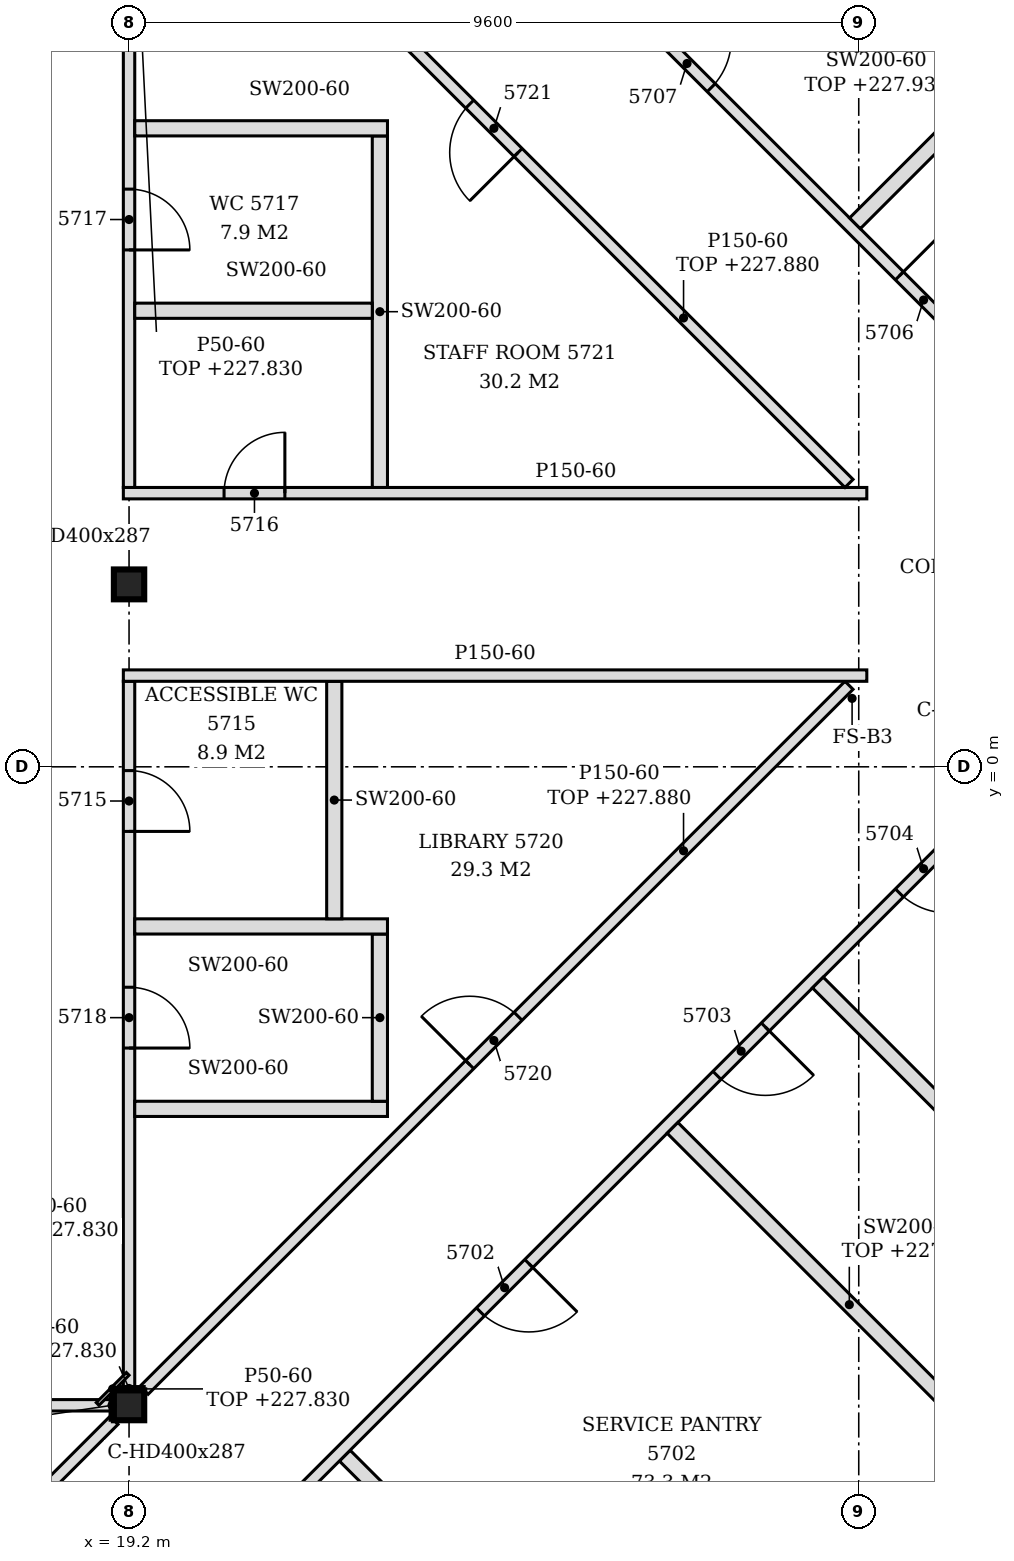
"""IFC4 building model, lengths in metres.
Left out: names, types, materials, properties, quantities, classifications, styles, units other than length and angle.
Written with IfcOpenShell. Run it as: python <this file> out.ifc"""

import sys

from ifc_helpers import new_model, si_unit, direction, frame, frame_2d, origin, origin_2d, place, context, subcontext, project, spatial, polyline, rectangle, i_section, outline, extrude, element, fill, save


model = new_model("IFC4")
c1 = context("Model", 3, precision=1e-05, world=origin(), true_north=direction((0.0, 1.0)))
c2 = subcontext(c1, "Body", "Model", "MODEL_VIEW")
j1 = project(units=[si_unit("LENGTHUNIT", "METRE"), si_unit("PLANEANGLEUNIT", "RADIAN")], contexts=[c1])
p1 = place(None, origin())
s1 = spatial("IfcSite", under=j1, at=p1, CompositionType="ELEMENT")
p2 = place(p1, origin())
s2 = spatial("IfcBuilding", under=s1, at=p2, CompositionType="ELEMENT")
p3 = place(p2, frame((0.0, 0.0, 225.0)))
s3 = spatial("IfcBuildingStorey", under=s2, at=p3, CompositionType="ELEMENT", Elevation=225.0)
for number, where, z_axis, x_axis in (
    (1, (19.2, -8.4, -0.15), (0.0, 0.0, 1.0), (1.0, 0.0, 0.0)),
    (2, (19.2, 2.4, -0.15), (0.0, 0.0, 1.0), (1.0, 0.0, 0.0)),
):
    element("IfcColumn", number, at=place(p3, frame(where, z_axis=z_axis, x_axis=x_axis)), inside=s3, PredefinedType="COLUMN", context=c2, shape_type="SweptSolid", body=[
        extrude(i_section(OverallWidth=0.399, OverallDepth=0.393, WebThickness=0.023, FlangeThickness=0.037, FilletRadius=0.015, at=origin_2d()), origin(), (0.0, 0.0, 1.0), 3.6),
    ])
p4 = place(p3, frame((29.636, -16.66, 0.0), z_axis=(0.0, 0.0, 1.0), x_axis=(-0.707095420673, 0.707118141518, 0.0)))
e3 = element("IfcWall", 3, at=p4, inside=s3, PredefinedType="PARTITIONING", context=c2, shape_type="SweptSolid", body=[
    extrude(rectangle(XDim=10.745, YDim=0.2, at=frame_2d((5.373, 0.0))), origin(), (0.0, 0.0, 1.0), 2.88),
])
p5 = place(p3, frame((16.722, -14.272, 0.0), z_axis=(0.0, 0.0, 1.0), x_axis=(0.707106781187, 0.707106781187, 0.0)))
e4 = element("IfcWall", 4, at=p5, inside=s3, PredefinedType="PARTITIONING", context=c2, shape_type="SweptSolid", body=[
    extrude(rectangle(XDim=20.049, YDim=0.15, at=frame_2d((10.025, 0.0))), origin(), (0.0, 0.0, 1.0), 2.73),
])
p6 = place(p5, frame((4.892, 0.0, 0.0)))
e5 = element("IfcOpeningElement", 5, at=p6, cuts=e4, PredefinedType="OPENING", context=c2, shape_type="SweptSolid", body=[
    extrude(rectangle(XDim=0.9, YDim=2.1, at=frame_2d((0.45, 1.05))), frame((0.0, 0.085, 0.0), z_axis=(0.0, -1.0, 0.0), x_axis=(1.0, 0.0, 0.0)), (0.0, 0.0, 1.0), 0.17),
])
p7 = place(p5, frame((10.042, 0.0, 0.0)))
e6 = element("IfcOpeningElement", 6, at=p7, cuts=e4, PredefinedType="OPENING", context=c2, shape_type="SweptSolid", body=[
    extrude(rectangle(XDim=0.9, YDim=2.1, at=frame_2d((0.45, 1.05))), frame((0.0, 0.085, 0.0), z_axis=(0.0, -1.0, 0.0), x_axis=(1.0, 0.0, 0.0)), (0.0, 0.0, 1.0), 0.17),
])
p8 = place(p5, frame((14.443, 0.0, 0.0)))
e7 = element("IfcOpeningElement", 7, at=p8, cuts=e4, PredefinedType="OPENING", context=c2, shape_type="SweptSolid", body=[
    extrude(rectangle(XDim=0.9, YDim=2.1, at=frame_2d((0.45, 1.05))), frame((0.0, 0.085, 0.0), z_axis=(0.0, -1.0, 0.0), x_axis=(1.0, 0.0, 0.0)), (0.0, 0.0, 1.0), 0.17),
])
p9 = place(p5, frame((17.837, 0.0, 0.0)))
e8 = element("IfcOpeningElement", 8, at=p9, cuts=e4, PredefinedType="OPENING", context=c2, shape_type="SweptSolid", body=[
    extrude(rectangle(XDim=0.9, YDim=2.1, at=frame_2d((0.45, 1.05))), frame((0.0, 0.085, 0.0), z_axis=(0.0, -1.0, 0.0), x_axis=(1.0, 0.0, 0.0)), (0.0, 0.0, 1.0), 0.17),
])
p10 = place(p3, frame((15.728, -11.872, 0.0), z_axis=(0.0, 0.0, 1.0), x_axis=(0.707080416772, 0.707133144618, 0.0)))
e9 = element("IfcWall", 9, at=p10, inside=s3, PredefinedType="PARTITIONING", context=c2, shape_type="SweptSolid", body=[
    extrude(rectangle(XDim=4.63, YDim=0.15, at=frame_2d((2.315, 0.0))), origin(), (0.0, 0.0, 1.0), 3.45),
])
p11 = place(p3, frame((35.86, -10.436, 0.0), z_axis=(0.0, 0.0, 1.0), x_axis=(-0.707106781187, 0.707106781187, 0.0)))
e10 = element("IfcWall", 10, at=p11, inside=s3, PredefinedType="PARTITIONING", context=c2, shape_type="SweptSolid", body=[
    extrude(rectangle(XDim=10.745, YDim=0.2, at=frame_2d((5.373, 0.0))), origin(), (0.0, 0.0, 1.0), 2.88),
])
p12 = place(p3, frame((31.002, -9.402, 0.0), z_axis=(0.0, 0.0, 1.0), x_axis=(-0.707088226093, 0.707125335793, 0.0)))
e11 = element("IfcWall", 11, at=p12, inside=s3, PredefinedType="PARTITIONING", context=c2, shape_type="SweptSolid", body=[
    extrude(rectangle(XDim=6.579, YDim=0.2, at=frame_2d((3.29, 0.0))), origin(), (0.0, 0.0, 1.0), 2.88),
])
p13 = place(p3, frame((7.399, -8.4, 0.0), z_axis=(0.0, 0.0, 1.0), x_axis=(1.0, 0.0, 0.0)))
e12 = element("IfcWall", 12, at=p13, inside=s3, PredefinedType="PARTITIONING", context=c2, shape_type="SweptSolid", body=[
    extrude(rectangle(XDim=11.601, YDim=0.15, at=frame_2d((5.801, 0.0))), origin(), (0.0, 0.0, 1.0), 2.83),
])
p14 = place(p13, frame((5.351, 0.0, 0.0)))
e13 = element("IfcOpeningElement", 13, at=p14, cuts=e12, PredefinedType="OPENING", context=c2, shape_type="SweptSolid", body=[
    extrude(rectangle(XDim=0.9, YDim=2.1, at=frame_2d((0.45, 1.05))), frame((0.0, 0.085, 0.0), z_axis=(0.0, -1.0, 0.0), x_axis=(1.0, 0.0, 0.0)), (0.0, 0.0, 1.0), 0.17),
])
p15 = place(p3, frame((19.2, -8.204, 0.0), z_axis=(0.0, 0.0, 1.0), x_axis=(0.0, 1.0, 0.0)))
e14 = element("IfcWall", 14, at=p15, inside=s3, PredefinedType="PARTITIONING", context=c2, shape_type="SweptSolid", body=[
    extrude(rectangle(XDim=9.329, YDim=0.15, at=frame_2d((4.664, 0.0))), origin(), (0.0, 0.0, 1.0), 2.83),
])
p16 = place(p15, frame((7.354, 0.0, 0.0)))
e15 = element("IfcOpeningElement", 15, at=p16, cuts=e14, PredefinedType="OPENING", context=c2, shape_type="SweptSolid", body=[
    extrude(rectangle(XDim=0.8, YDim=2.1, at=frame_2d((0.4, 1.05))), frame((0.0, 0.085, 0.0), z_axis=(0.0, -1.0, 0.0), x_axis=(1.0, 0.0, 0.0)), (0.0, 0.0, 1.0), 0.17),
])
p17 = place(p15, frame((4.503, 0.0, 0.0)))
e16 = element("IfcOpeningElement", 16, at=p17, cuts=e14, PredefinedType="OPENING", context=c2, shape_type="SweptSolid", body=[
    extrude(rectangle(XDim=0.8, YDim=2.1, at=frame_2d((0.4, 1.05))), frame((0.0, 0.085, 0.0), z_axis=(0.0, -1.0, 0.0), x_axis=(1.0, 0.0, 0.0)), (0.0, 0.0, 1.0), 0.17),
])
p18 = place(p3, frame((19.398, -8.202, 0.0), z_axis=(0.0, 0.0, 1.0), x_axis=(0.707116088468, 0.707097473782, 0.0)))
e17 = element("IfcWall", 17, at=p18, inside=s3, PredefinedType="PARTITIONING", context=c2, shape_type="SweptSolid", body=[
    extrude(rectangle(XDim=13.115, YDim=0.15, at=frame_2d((6.558, 0.0))), origin(), (0.0, 0.0, 1.0), 2.88),
])
p19 = place(p18, frame((6.058, 0.0, 0.0)))
e18 = element("IfcOpeningElement", 18, at=p19, cuts=e17, PredefinedType="OPENING", context=c2, shape_type="SweptSolid", body=[
    extrude(rectangle(XDim=0.9, YDim=2.1, at=frame_2d((0.45, 1.05))), frame((0.0, 0.085, 0.0), z_axis=(0.0, -1.0, 0.0), x_axis=(1.0, 0.0, 0.0)), (0.0, 0.0, 1.0), 0.17),
])
p20 = place(p3, frame((19.275, -4.5, 0.0), z_axis=(0.0, 0.0, 1.0), x_axis=(1.0, 0.0, 0.0)))
e19 = element("IfcWall", 19, at=p20, inside=s3, PredefinedType="PARTITIONING", context=c2, shape_type="SweptSolid", body=[
    extrude(outline(polyline([(0.0, 0.0), (3.325, 0.0), (3.325, 3.45), (0.075, 3.45), (0.073, 2.83), (0.0, 2.83), (0.0, 0.0)])), frame((0.0, 0.1, 0.0), z_axis=(0.0, -1.0, 0.0), x_axis=(1.0, 0.0, 0.0)), (0.0, 0.0, 1.0), 0.2),
])
p21 = place(p3, frame((22.5, -4.4, 0.0), z_axis=(0.0, 0.0, 1.0), x_axis=(0.0, 1.0, 0.0)))
e20 = element("IfcWall", 20, at=p21, inside=s3, PredefinedType="PARTITIONING", context=c2, shape_type="SweptSolid", body=[
    extrude(rectangle(XDim=2.2, YDim=0.2, at=frame_2d((1.1, 0.0))), origin(), (0.0, 0.0, 1.0), 3.45),
])
p22 = place(p3, frame((19.275, -2.1, 0.0), z_axis=(0.0, 0.0, 1.0), x_axis=(1.0, 0.0, 0.0)))
e21 = element("IfcWall", 21, at=p22, inside=s3, PredefinedType="PARTITIONING", context=c2, shape_type="SweptSolid", body=[
    extrude(outline(polyline([(0.0, 0.0), (3.325, 0.0), (3.325, 3.45), (0.075, 3.45), (0.073, 2.83), (0.0, 2.83), (0.0, 0.0)])), frame((0.0, 0.1, 0.0), z_axis=(0.0, -1.0, 0.0), x_axis=(1.0, 0.0, 0.0)), (0.0, 0.0, 1.0), 0.2),
])
p23 = place(p3, frame((21.9, -2.0, 0.0), z_axis=(0.0, 0.0, 1.0), x_axis=(0.0, 1.0, 0.0)))
e22 = element("IfcWall", 22, at=p23, inside=s3, PredefinedType="PARTITIONING", context=c2, shape_type="SweptSolid", body=[
    extrude(outline(polyline([(0.0, 0.0), (3.125, 0.0), (3.125, 3.45), (2.105, 3.45), (2.103, 2.88), (1.895, 2.88), (1.893, 3.45), (0.0, 3.45), (0.0, 0.0)])), frame((0.0, 0.1, 0.0), z_axis=(0.0, -1.0, 0.0), x_axis=(1.0, 0.0, 0.0)), (0.0, 0.0, 1.0), 0.2),
])
p24 = place(p3, frame((19.125, 1.2, 0.0), z_axis=(0.0, 0.0, 1.0), x_axis=(1.0, 0.0, 0.0)))
e23 = element("IfcWall", 23, at=p24, inside=s3, PredefinedType="PARTITIONING", context=c2, shape_type="SweptSolid", body=[
    extrude(outline(polyline([(0.0, 0.0), (9.781, 0.0), (9.781, 3.45), (0.225, 3.45), (0.223, 2.83), (0.0, 2.83), (0.0, 0.0)])), frame((0.0, 0.075, 0.0), z_axis=(0.0, -1.0, 0.0), x_axis=(1.0, 0.0, 0.0)), (0.0, 0.0, 1.0), 0.15),
])
p25 = place(p3, frame((33.341, 2.453, 0.0), z_axis=(0.0, 0.0, 1.0), x_axis=(-0.707098652635, 0.707114909645, 0.0)))
e24 = element("IfcWall", 24, at=p25, inside=s3, PredefinedType="PARTITIONING", context=c2, shape_type="SweptSolid", body=[
    extrude(rectangle(XDim=15.018, YDim=0.15, at=frame_2d((7.509, 0.0))), origin(), (0.0, 0.0, 1.0), 2.88),
])
p26 = place(p25, frame((4.766, 0.0, 0.0)))
e25 = element("IfcOpeningElement", 25, at=p26, cuts=e24, PredefinedType="OPENING", context=c2, shape_type="SweptSolid", body=[
    extrude(rectangle(XDim=0.9, YDim=2.1, at=frame_2d((0.45, 1.05))), frame((0.0, 0.085, 0.0), z_axis=(0.0, -1.0, 0.0), x_axis=(1.0, 0.0, 0.0)), (0.0, 0.0, 1.0), 0.17),
])
p27 = place(p25, frame((9.167, 0.0, 0.0)))
e26 = element("IfcOpeningElement", 26, at=p27, cuts=e24, PredefinedType="OPENING", context=c2, shape_type="SweptSolid", body=[
    extrude(rectangle(XDim=0.9, YDim=2.1, at=frame_2d((0.45, 1.05))), frame((0.0, 0.085, 0.0), z_axis=(0.0, -1.0, 0.0), x_axis=(1.0, 0.0, 0.0)), (0.0, 0.0, 1.0), 0.17),
])
p28 = place(p25, frame((13.482, 0.0, 0.0)))
e27 = element("IfcOpeningElement", 27, at=p28, cuts=e24, PredefinedType="OPENING", context=c2, shape_type="SweptSolid", body=[
    extrude(rectangle(XDim=0.9, YDim=2.1, at=frame_2d((0.45, 1.05))), frame((0.0, 0.085, 0.0), z_axis=(0.0, -1.0, 0.0), x_axis=(1.0, 0.0, 0.0)), (0.0, 0.0, 1.0), 0.17),
])
p29 = place(p3, frame((19.125, 3.6, 0.0), z_axis=(0.0, 0.0, 1.0), x_axis=(1.0, 0.0, 0.0)))
e28 = element("IfcWall", 28, at=p29, inside=s3, PredefinedType="PARTITIONING", context=c2, shape_type="SweptSolid", body=[
    extrude(outline(polyline([(0.0, 0.0), (9.781, 0.0), (9.781, 3.45), (0.225, 3.45), (0.223, 2.83), (0.0, 2.83), (0.0, 0.0)])), frame((0.0, 0.075, 0.0), z_axis=(0.0, -1.0, 0.0), x_axis=(1.0, 0.0, 0.0)), (0.0, 0.0, 1.0), 0.15),
])
p30 = place(p29, frame((1.325, 0.0, 0.0)))
e29 = element("IfcOpeningElement", 29, at=p30, cuts=e28, PredefinedType="OPENING", context=c2, shape_type="SweptSolid", body=[
    extrude(rectangle(XDim=0.8, YDim=2.1, at=frame_2d((0.4, 1.05))), frame((0.0, 0.085, 0.0), z_axis=(0.0, -1.0, 0.0), x_axis=(1.0, 0.0, 0.0)), (0.0, 0.0, 1.0), 0.17),
])
p31 = place(p3, frame((19.2, 3.675, 0.0), z_axis=(0.0, 0.0, 1.0), x_axis=(0.0, 1.0, 0.0)))
e30 = element("IfcWall", 30, at=p31, inside=s3, PredefinedType="PARTITIONING", context=c2, shape_type="SweptSolid", body=[
    extrude(rectangle(XDim=9.328, YDim=0.15, at=frame_2d((4.664, 0.0))), origin(), (0.0, 0.0, 1.0), 2.83),
])
p32 = place(p31, frame((3.125, 0.0, 0.0)))
e31 = element("IfcOpeningElement", 31, at=p32, cuts=e30, PredefinedType="OPENING", context=c2, shape_type="SweptSolid", body=[
    extrude(rectangle(XDim=0.8, YDim=2.1, at=frame_2d((0.4, 1.05))), frame((0.0, 0.085, 0.0), z_axis=(0.0, -1.0, 0.0), x_axis=(1.0, 0.0, 0.0)), (0.0, 0.0, 1.0), 0.17),
])
p33 = place(p3, frame((22.5, 3.675, 0.0), z_axis=(0.0, 0.0, 1.0), x_axis=(0.0, 1.0, 0.0)))
e32 = element("IfcWall", 32, at=p33, inside=s3, PredefinedType="PARTITIONING", context=c2, shape_type="SweptSolid", body=[
    extrude(outline(polyline([(0.0, 0.0), (4.625, 0.0), (4.625, 3.45), (1.23, 3.45), (1.228, 2.88), (1.02, 2.88), (1.018, 3.45), (0.0, 3.45), (0.0, 0.0)])), frame((0.0, 0.1, 0.0), z_axis=(0.0, -1.0, 0.0), x_axis=(1.0, 0.0, 0.0)), (0.0, 0.0, 1.0), 0.2),
])
p34 = place(p3, frame((28.672, 3.728, 0.0), z_axis=(0.0, 0.0, 1.0), x_axis=(-0.707116088468, 0.707097473782, 0.0)))
e33 = element("IfcWall", 33, at=p34, inside=s3, PredefinedType="PARTITIONING", context=c2, shape_type="SweptSolid", body=[
    extrude(rectangle(XDim=13.115, YDim=0.15, at=frame_2d((6.558, 0.0))), origin(), (0.0, 0.0, 1.0), 2.88),
])
p35 = place(p34, frame((6.157, 0.0, 0.0)))
e34 = element("IfcOpeningElement", 34, at=p35, cuts=e33, PredefinedType="OPENING", context=c2, shape_type="SweptSolid", body=[
    extrude(rectangle(XDim=0.9, YDim=2.1, at=frame_2d((0.45, 1.05))), frame((0.0, 0.085, 0.0), z_axis=(0.0, -1.0, 0.0), x_axis=(1.0, 0.0, 0.0)), (0.0, 0.0, 1.0), 0.17),
])
p36 = place(p3, frame((19.275, 6.0, 0.0), z_axis=(0.0, 0.0, 1.0), x_axis=(1.0, 0.0, 0.0)))
e35 = element("IfcWall", 35, at=p36, inside=s3, PredefinedType="PARTITIONING", context=c2, shape_type="SweptSolid", body=[
    extrude(outline(polyline([(0.0, 0.0), (3.125, 0.0), (3.125, 3.45), (0.075, 3.45), (0.073, 2.83), (0.0, 2.83), (0.0, 0.0)])), frame((0.0, 0.1, 0.0), z_axis=(0.0, -1.0, 0.0), x_axis=(1.0, 0.0, 0.0)), (0.0, 0.0, 1.0), 0.2),
])
p37 = place(p3, frame((28.75, 7.15, 0.0), z_axis=(0.0, 0.0, 1.0), x_axis=(0.7070684525, 0.707145107796, 0.0)))
e36 = element("IfcWall", 36, at=p37, inside=s3, PredefinedType="PARTITIONING", context=c2, shape_type="SweptSolid", body=[
    extrude(rectangle(XDim=3.185, YDim=0.2, at=frame_2d((1.592, 0.0))), origin(), (0.0, 0.0, 1.0), 2.93),
])
p38 = place(p3, frame((19.275, 8.4, 0.0), z_axis=(0.0, 0.0, 1.0), x_axis=(1.0, 0.0, 0.0)))
e37 = element("IfcWall", 37, at=p38, inside=s3, PredefinedType="PARTITIONING", context=c2, shape_type="SweptSolid", body=[
    extrude(outline(polyline([(0.0, 0.0), (3.325, 0.0), (3.325, 3.45), (0.075, 3.45), (0.073, 2.83), (0.0, 2.83), (0.0, 0.0)])), frame((0.0, 0.1, 0.0), z_axis=(0.0, -1.0, 0.0), x_axis=(1.0, 0.0, 0.0)), (0.0, 0.0, 1.0), 0.2),
])
p39 = place(p3, frame((18.786, -8.382, 0.0), z_axis=(0.0, 0.0, 1.0), x_axis=(0.707106781187, 0.707106781187, 0.0)))
e38 = element("IfcWall", 38, at=p39, inside=s3, PredefinedType="PARTITIONING", context=c2, shape_type="SweptSolid", body=[
    extrude(rectangle(XDim=0.56, YDim=0.05, at=frame_2d((0.28, 0.0))), origin(), (0.0, 0.0, 1.0), 2.83),
])
p40 = place(p3, frame((19.0, -8.178, 0.0), z_axis=(0.0, 0.0, 1.0), x_axis=(1.0, 0.0, 0.0)))
e39 = element("IfcWall", 39, at=p40, inside=s3, PredefinedType="PARTITIONING", context=c2, shape_type="SweptSolid", body=[
    extrude(rectangle(XDim=0.399, YDim=0.05, at=frame_2d((0.199, 0.0))), origin(), (0.0, 0.0, 1.0), 2.83),
])
p41 = place(p3, frame((18.976, -8.596, 0.0), z_axis=(0.0, 0.0, 1.0), x_axis=(0.0, 1.0, 0.0)))
e40 = element("IfcWall", 40, at=p41, inside=s3, PredefinedType="PARTITIONING", context=c2, shape_type="SweptSolid", body=[
    extrude(rectangle(XDim=0.393, YDim=0.05, at=frame_2d((0.196, 0.0))), origin(), (0.0, 0.0, 1.0), 2.83),
])
p42 = place(p7, frame((0.9, 0.0, 0.0), z_axis=(0.0, 0.0, 1.0), x_axis=(-1.0, 0.0, 0.0)))
e41 = element("IfcDoor", 41, at=p42, inside=s3, OperationType="SINGLE_SWING_LEFT", PredefinedType="DOOR", context=c2, shape_type="SweptSolid", body=[
    extrude(rectangle(XDim=0.9, YDim=2.1, at=frame_2d((0.45, 1.05))), frame((0.0, 0.025, 0.0), z_axis=(0.0, -1.0, 0.0), x_axis=(1.0, 0.0, 0.0)), (0.0, 0.0, 1.0), 0.05),
])
fill(e6, e41)
p43 = place(p8, frame((0.9, 0.0, 0.0), z_axis=(0.0, 0.0, 1.0), x_axis=(-1.0, 0.0, 0.0)))
e42 = element("IfcDoor", 42, at=p43, inside=s3, OperationType="SINGLE_SWING_LEFT", PredefinedType="DOOR", context=c2, shape_type="SweptSolid", body=[
    extrude(rectangle(XDim=0.9, YDim=2.1, at=frame_2d((0.45, 1.05))), frame((0.0, 0.025, 0.0), z_axis=(0.0, -1.0, 0.0), x_axis=(1.0, 0.0, 0.0)), (0.0, 0.0, 1.0), 0.05),
])
fill(e7, e42)
p44 = place(p9, frame((0.9, 0.0, 0.0), z_axis=(0.0, 0.0, 1.0), x_axis=(-1.0, 0.0, 0.0)))
e43 = element("IfcDoor", 43, at=p44, inside=s3, OperationType="SINGLE_SWING_LEFT", PredefinedType="DOOR", context=c2, shape_type="SweptSolid", body=[
    extrude(rectangle(XDim=0.9, YDim=2.1, at=frame_2d((0.45, 1.05))), frame((0.0, 0.025, 0.0), z_axis=(0.0, -1.0, 0.0), x_axis=(1.0, 0.0, 0.0)), (0.0, 0.0, 1.0), 0.05),
])
fill(e8, e43)
p45 = place(p26, frame((0.9, 0.0, 0.0), z_axis=(0.0, 0.0, 1.0), x_axis=(-1.0, 0.0, 0.0)))
e44 = element("IfcDoor", 44, at=p45, inside=s3, OperationType="SINGLE_SWING_LEFT", PredefinedType="DOOR", context=c2, shape_type="SweptSolid", body=[
    extrude(rectangle(XDim=0.9, YDim=2.1, at=frame_2d((0.45, 1.05))), frame((0.0, 0.025, 0.0), z_axis=(0.0, -1.0, 0.0), x_axis=(1.0, 0.0, 0.0)), (0.0, 0.0, 1.0), 0.05),
])
fill(e25, e44)
p46 = place(p27, frame((0.9, 0.0, 0.0), z_axis=(0.0, 0.0, 1.0), x_axis=(-1.0, 0.0, 0.0)))
e45 = element("IfcDoor", 45, at=p46, inside=s3, OperationType="SINGLE_SWING_LEFT", PredefinedType="DOOR", context=c2, shape_type="SweptSolid", body=[
    extrude(rectangle(XDim=0.9, YDim=2.1, at=frame_2d((0.45, 1.05))), frame((0.0, 0.025, 0.0), z_axis=(0.0, -1.0, 0.0), x_axis=(1.0, 0.0, 0.0)), (0.0, 0.0, 1.0), 0.05),
])
fill(e26, e45)
p47 = place(p16, frame((0.8, 0.0, 0.0), z_axis=(0.0, 0.0, 1.0), x_axis=(-1.0, 0.0, 0.0)))
e46 = element("IfcDoor", 46, at=p47, inside=s3, OperationType="SINGLE_SWING_RIGHT", PredefinedType="DOOR", context=c2, shape_type="SweptSolid", body=[
    extrude(rectangle(XDim=0.8, YDim=2.1, at=frame_2d((0.4, 1.05))), frame((0.0, 0.025, 0.0), z_axis=(0.0, -1.0, 0.0), x_axis=(1.0, 0.0, 0.0)), (0.0, 0.0, 1.0), 0.05),
])
fill(e15, e46)
p48 = place(p30, origin())
e47 = element("IfcDoor", 47, at=p48, inside=s3, OperationType="SINGLE_SWING_RIGHT", PredefinedType="DOOR", context=c2, shape_type="SweptSolid", body=[
    extrude(rectangle(XDim=0.8, YDim=2.1, at=frame_2d((0.4, 1.05))), frame((0.0, 0.025, 0.0), z_axis=(0.0, -1.0, 0.0), x_axis=(1.0, 0.0, 0.0)), (0.0, 0.0, 1.0), 0.05),
])
fill(e29, e47)
p49 = place(p32, frame((0.8, 0.0, 0.0), z_axis=(0.0, 0.0, 1.0), x_axis=(-1.0, 0.0, 0.0)))
e48 = element("IfcDoor", 48, at=p49, inside=s3, OperationType="SINGLE_SWING_RIGHT", PredefinedType="DOOR", context=c2, shape_type="SweptSolid", body=[
    extrude(rectangle(XDim=0.8, YDim=2.1, at=frame_2d((0.4, 1.05))), frame((0.0, 0.025, 0.0), z_axis=(0.0, -1.0, 0.0), x_axis=(1.0, 0.0, 0.0)), (0.0, 0.0, 1.0), 0.05),
])
fill(e31, e48)
p50 = place(p17, frame((0.8, 0.0, 0.0), z_axis=(0.0, 0.0, 1.0), x_axis=(-1.0, 0.0, 0.0)))
e49 = element("IfcDoor", 49, at=p50, inside=s3, OperationType="SINGLE_SWING_RIGHT", PredefinedType="DOOR", context=c2, shape_type="SweptSolid", body=[
    extrude(rectangle(XDim=0.8, YDim=2.1, at=frame_2d((0.4, 1.05))), frame((0.0, 0.025, 0.0), z_axis=(0.0, -1.0, 0.0), x_axis=(1.0, 0.0, 0.0)), (0.0, 0.0, 1.0), 0.05),
])
fill(e16, e49)
p51 = place(p19, origin())
e50 = element("IfcDoor", 50, at=p51, inside=s3, OperationType="SINGLE_SWING_LEFT", PredefinedType="DOOR", context=c2, shape_type="SweptSolid", body=[
    extrude(rectangle(XDim=0.9, YDim=2.1, at=frame_2d((0.45, 1.05))), frame((0.0, 0.025, 0.0), z_axis=(0.0, -1.0, 0.0), x_axis=(1.0, 0.0, 0.0)), (0.0, 0.0, 1.0), 0.05),
])
fill(e18, e50)
p52 = place(p35, origin())
e51 = element("IfcDoor", 51, at=p52, inside=s3, OperationType="SINGLE_SWING_LEFT", PredefinedType="DOOR", context=c2, shape_type="SweptSolid", body=[
    extrude(rectangle(XDim=0.9, YDim=2.1, at=frame_2d((0.45, 1.05))), frame((0.0, 0.025, 0.0), z_axis=(0.0, -1.0, 0.0), x_axis=(1.0, 0.0, 0.0)), (0.0, 0.0, 1.0), 0.05),
])
fill(e34, e51)
save(model, sys.argv[1])
